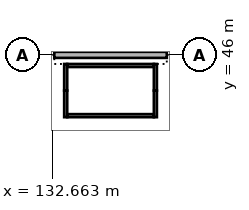
"""IFC4 building model, lengths in metres.
Left out: names, types, materials, properties, quantities, classifications, styles, units other than length and angle.
Written with IfcOpenShell. Run it as: python <this file> out.ifc"""

import sys

from ifc_helpers import new_model, si_unit, direction, frame, frame_2d, origin, origin_2d, place, context, subcontext, project, spatial, rectangle, extrude, element, fill, save


model = new_model("IFC4")
c1 = context("Model", 3, precision=1e-05, world=origin(), true_north=direction((0.0, 1.0)))
c2 = subcontext(c1, "Body", "Model", "MODEL_VIEW")
j1 = project(units=[si_unit("LENGTHUNIT", "METRE"), si_unit("PLANEANGLEUNIT", "RADIAN")], contexts=[c1])
p1 = place(None, origin())
s1 = spatial("IfcSite", under=j1, at=p1, CompositionType="ELEMENT")
p2 = place(p1, origin())
s2 = spatial("IfcBuilding", under=s1, at=p2, CompositionType="ELEMENT")
p3 = place(p2, origin())
s3 = spatial("IfcBuildingStorey", under=s2, at=p3, CompositionType="ELEMENT", Elevation=0.0)
for number, where, z_axis, x_axis in (
    (1, (132.0, 46.0, 0.0), (0.0, 0.0, 1.0), (1.0, 0.0, 0.0)),
    (2, (141.0, 46.0, 0.0), (0.0, 0.0, 1.0), (1.0, 0.0, 0.0)),
):
    element("IfcColumn", number, at=place(p3, frame(where, z_axis=z_axis, x_axis=x_axis)), inside=s3, PredefinedType="COLUMN", context=c2, shape_type="SweptSolid", body=[
        extrude(rectangle(XDim=1.6, YDim=1.2, at=origin_2d()), origin(), (0.0, 0.0, 1.0), 5.0),
    ])
for number, where, z_axis, x_axis in (
    (3, (133.55, 45.4, 0.0), (0.0, 0.0, 1.0), (0.0, -1.0, 0.0)),
    (4, (133.55, 43.65, 0.0), (0.0, 0.0, 1.0), (0.0, -1.0, 0.0)),
    (5, (139.45, 45.4, 0.0), (0.0, 0.0, 1.0), (0.0, -1.0, 0.0)),
    (6, (139.45, 43.65, 0.0), (0.0, 0.0, 1.0), (0.0, -1.0, 0.0)),
):
    element("IfcWall", number, at=place(p3, frame(where, z_axis=z_axis, x_axis=x_axis)), inside=s3, PredefinedType="SOLIDWALL", context=c2, shape_type="SweptSolid", body=[
        extrude(rectangle(XDim=1.75, YDim=0.2, at=frame_2d((0.875, 0.0))), origin(), (0.0, 0.0, 1.0), 3.2),
    ])
p4 = place(p3, frame((133.65, 42.0, 0.0), z_axis=(0.0, 0.0, 1.0), x_axis=(1.0, 0.0, 0.0)))
e7 = element("IfcWall", 7, at=p4, inside=s3, PredefinedType="SOLIDWALL", context=c2, shape_type="SweptSolid", body=[
    extrude(rectangle(XDim=5.7, YDim=0.2, at=frame_2d((2.85, 0.0))), origin(), (0.0, 0.0, 1.0), 3.2),
])
p5 = place(p4, frame((0.2, 0.0, 0.0)))
e8 = element("IfcOpeningElement", 8, at=p5, cuts=e7, PredefinedType="OPENING", context=c2, shape_type="SweptSolid", body=[
    extrude(rectangle(XDim=1.1, YDim=2.1, at=frame_2d((0.55, 1.05))), frame((0.0, 0.11, 0.0), z_axis=(0.0, -1.0, 0.0), x_axis=(1.0, 0.0, 0.0)), (0.0, 0.0, 1.0), 0.22),
])
p6 = place(p3, frame((133.65, 45.3, 0.0), z_axis=(0.0, 0.0, 1.0), x_axis=(1.0, 0.0, 0.0)))
e9 = element("IfcWall", 9, at=p6, inside=s3, PredefinedType="SOLIDWALL", context=c2, shape_type="SweptSolid", body=[
    extrude(rectangle(XDim=5.7, YDim=0.2, at=frame_2d((2.85, 0.0))), origin(), (0.0, 0.0, 1.0), 3.2),
])
p7 = place(p3, frame((132.8, 46.0, 0.0), z_axis=(0.0, 0.0, 1.0), x_axis=(1.0, 0.0, 0.0)))
e10 = element("IfcWall", 10, at=p7, inside=s3, PredefinedType="SOLIDWALL", context=c2, shape_type="SweptSolid", body=[
    extrude(rectangle(XDim=7.4, YDim=0.4, at=frame_2d((3.7, 0.0))), origin(), (0.0, 0.0, 1.0), 4.4),
])
p8 = place(p7, frame((1.45, 0.0, 0.0)))
e11 = element("IfcOpeningElement", 11, at=p8, cuts=e10, PredefinedType="OPENING", context=c2, shape_type="SweptSolid", body=[
    extrude(rectangle(XDim=4.5, YDim=4.3, at=frame_2d((2.25, 2.15))), frame((0.0, 0.21, 0.0), z_axis=(0.0, -1.0, 0.0), x_axis=(1.0, 0.0, 0.0)), (0.0, 0.0, 1.0), 0.42),
])
p9 = place(p5, frame((1.1, 0.0, 0.0), z_axis=(0.0, 0.0, 1.0), x_axis=(-1.0, 0.0, 0.0)))
e12 = element("IfcDoor", 12, at=p9, inside=s3, OperationType="SINGLE_SWING_RIGHT", PredefinedType="DOOR", context=c2, shape_type="SweptSolid", body=[
    extrude(rectangle(XDim=1.1, YDim=2.1, at=frame_2d((0.55, 1.05))), frame((0.0, 0.025, 0.0), z_axis=(0.0, -1.0, 0.0), x_axis=(1.0, 0.0, 0.0)), (0.0, 0.0, 1.0), 0.05),
])
fill(e8, e12)
p10 = place(p8, frame((4.5, 0.0, 0.0), z_axis=(0.0, 0.0, 1.0), x_axis=(-1.0, 0.0, 0.0)))
e13 = element("IfcDoor", 13, at=p10, inside=s3, OperationType="ROLLINGUP", PredefinedType="DOOR", context=c2, shape_type="SweptSolid", body=[
    extrude(rectangle(XDim=4.5, YDim=4.3, at=frame_2d((2.25, 2.15))), frame((0.0, 0.025, 0.0), z_axis=(0.0, -1.0, 0.0), x_axis=(1.0, 0.0, 0.0)), (0.0, 0.0, 1.0), 0.05),
])
fill(e11, e13)
save(model, sys.argv[1])
